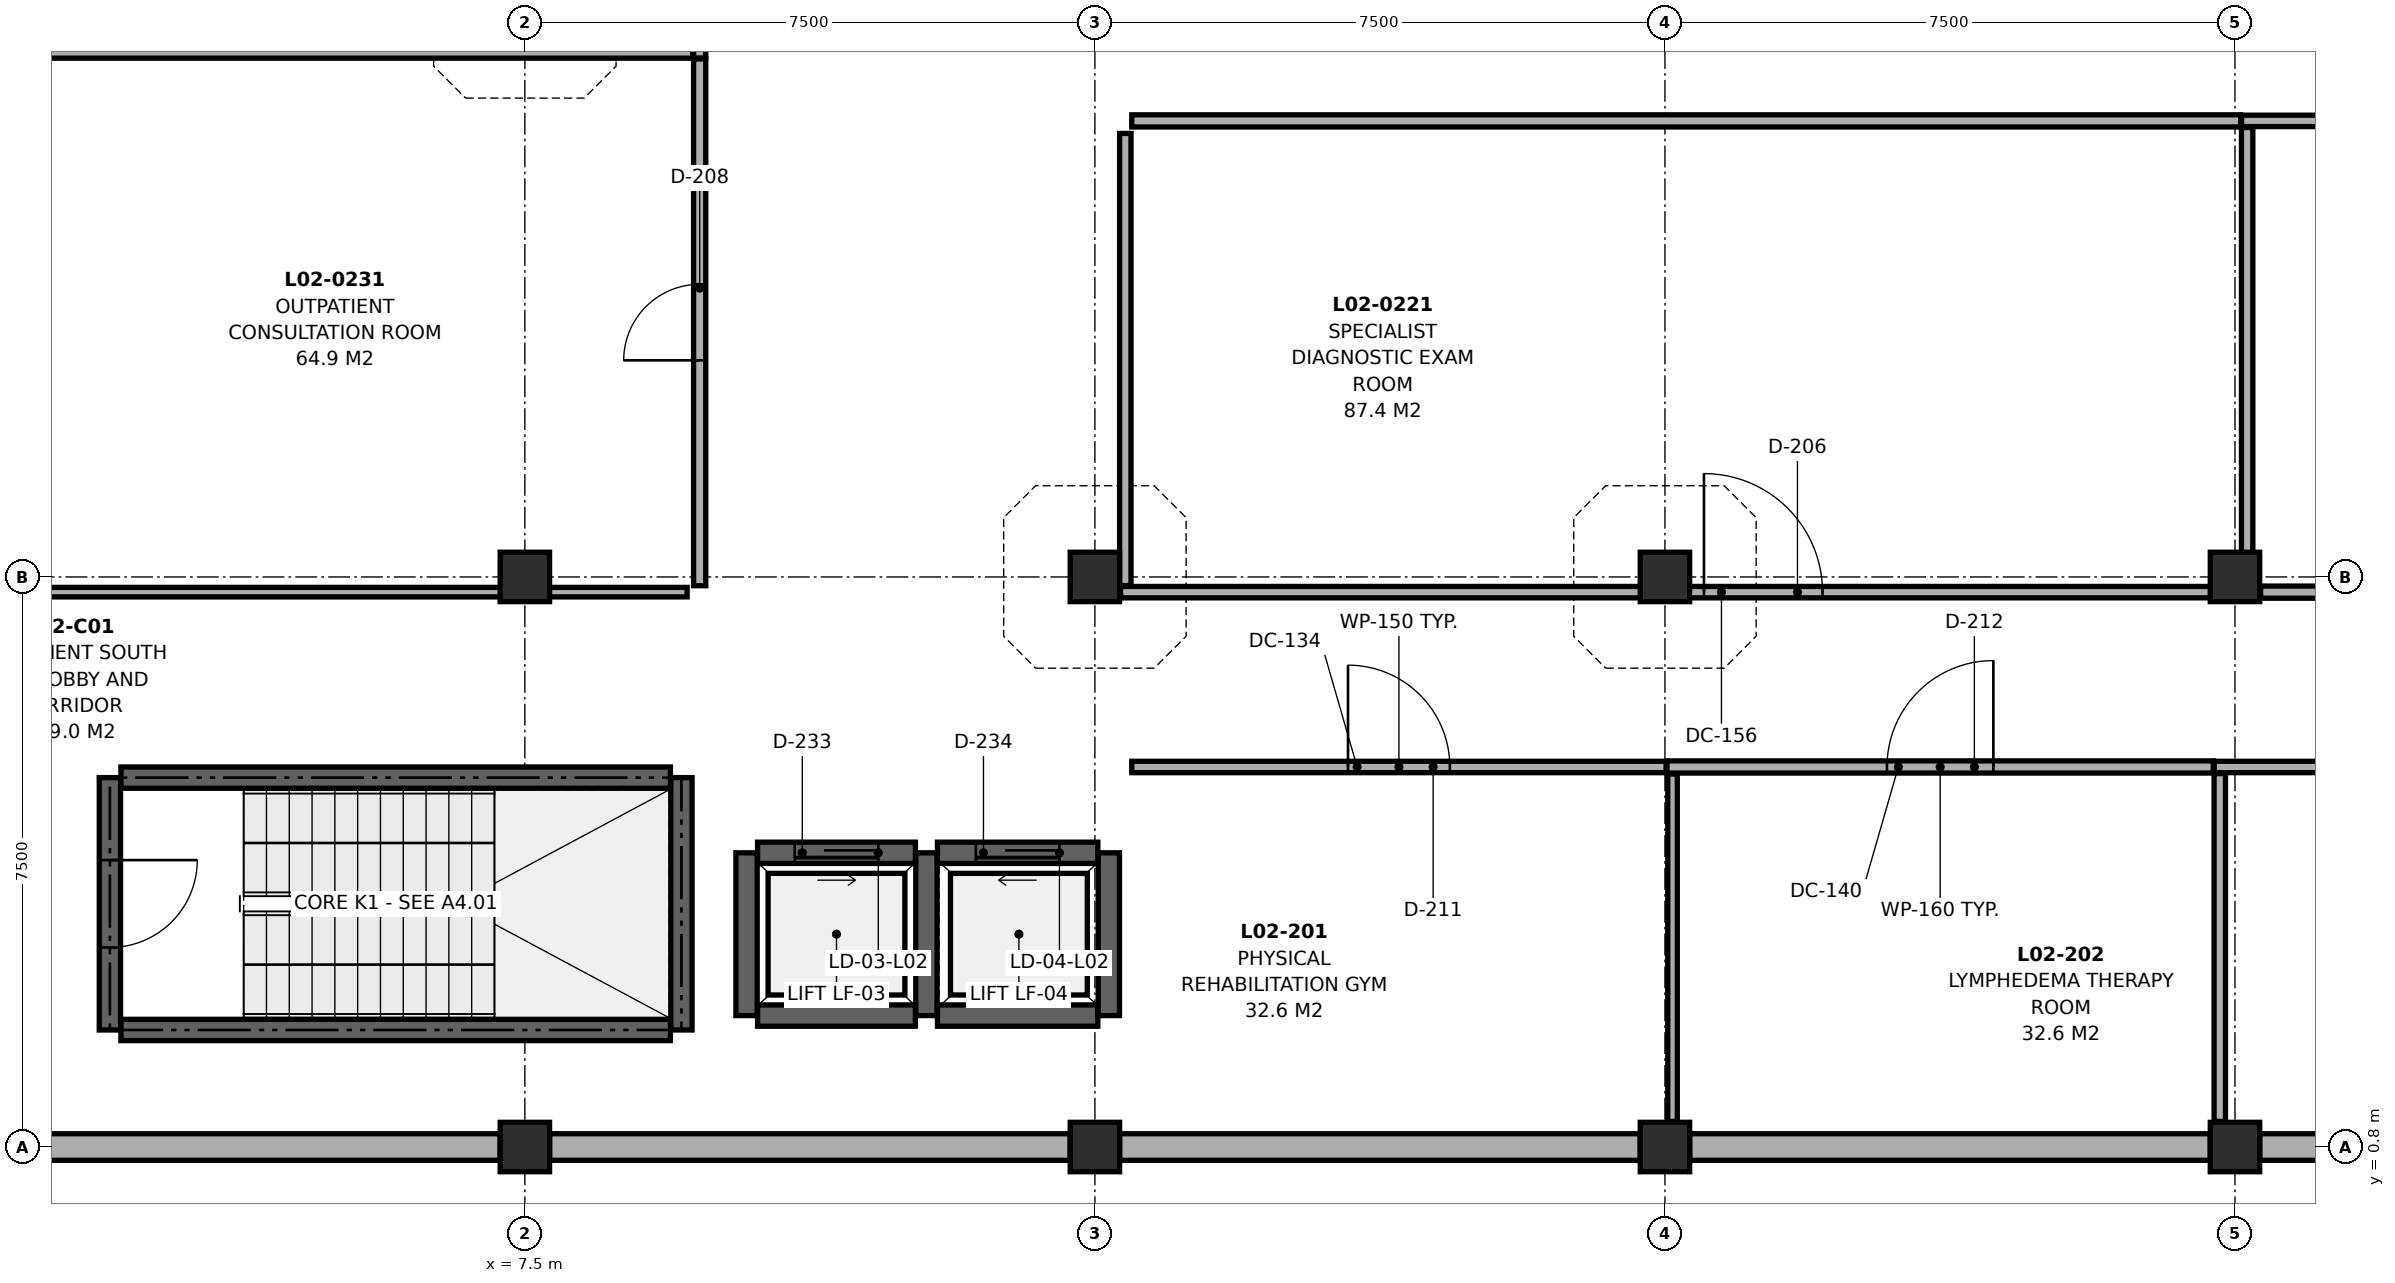
"""IFC4 building model, lengths in metres.
Left out: names, types, materials, properties, quantities, classifications, styles, units other than length and angle.
Written with IfcOpenShell. Run it as: python <this file> out.ifc"""

import sys

from ifc_helpers import new_model, si_unit, direction, frame, frame_2d, origin, origin_2d, place, context, subcontext, project, spatial, rectangle, extrude, element, fill, save


model = new_model("IFC4")
c1 = context("Model", 3, precision=1e-05, world=origin(), true_north=direction((0.0, 1.0)))
c2 = subcontext(c1, "Body", "Model", "MODEL_VIEW")
j1 = project(units=[si_unit("LENGTHUNIT", "METRE"), si_unit("PLANEANGLEUNIT", "RADIAN")], contexts=[c1])
p1 = place(None, origin())
s1 = spatial("IfcSite", under=j1, at=p1, CompositionType="ELEMENT")
p2 = place(p1, origin())
s2 = spatial("IfcBuilding", under=s1, at=p2, CompositionType="ELEMENT")
p3 = place(p2, frame((0.0, 0.0, 9.5)))
s3 = spatial("IfcBuildingStorey", under=s2, at=p3, CompositionType="ELEMENT", Elevation=9.5)
for number, where, z_axis, x_axis in (
    (1, (7.5, 0.8, 0.0), (0.0, 0.0, 1.0), (1.0, 0.0, 0.0)),
    (2, (7.5, 8.3, 0.0), (0.0, 0.0, 1.0), (1.0, 0.0, 0.0)),
    (3, (15.0, 0.8, 0.0), (0.0, 0.0, 1.0), (1.0, 0.0, 0.0)),
    (4, (15.0, 8.3, 0.0), (0.0, 0.0, 1.0), (1.0, 0.0, 0.0)),
    (5, (22.5, 0.8, 0.0), (0.0, 0.0, 1.0), (1.0, 0.0, 0.0)),
    (6, (22.5, 8.3, 0.0), (0.0, 0.0, 1.0), (1.0, 0.0, 0.0)),
    (7, (30.0, 0.8, 0.0), (0.0, 0.0, 1.0), (1.0, 0.0, 0.0)),
    (8, (30.0, 8.3, 0.0), (0.0, 0.0, 1.0), (1.0, 0.0, 0.0)),
):
    element("IfcColumn", number, at=place(p3, frame(where, z_axis=z_axis, x_axis=x_axis)), inside=s3, PredefinedType="COLUMN", context=c2, shape_type="SweptSolid", body=[
        extrude(rectangle(XDim=0.65, YDim=0.65, at=origin_2d()), origin(), (0.0, 0.0, 1.0), 3.7),
    ])
p4 = place(p3, frame((37.2, 0.8, 0.0), z_axis=(0.0, 0.0, 1.0), x_axis=(-1.0, 0.0, 0.0)))
e9 = element("IfcWall", 9, at=p4, inside=s3, PredefinedType="SOLIDWALL", context=c2, shape_type="SweptSolid", body=[
    extrude(rectangle(XDim=6.875, YDim=0.35, at=frame_2d((3.438, 0.0))), origin(), (0.0, 0.0, 1.0), 2.985),
])
for number, where, z_axis, x_axis in (
    (10, (29.675, 0.8, 0.0), (0.0, 0.0, 1.0), (-1.0, 0.0, 0.0)),
    (11, (22.175, 0.8, 0.0), (0.0, 0.0, 1.0), (-1.0, 0.0, 0.0)),
):
    element("IfcWall", number, at=place(p3, frame(where, z_axis=z_axis, x_axis=x_axis)), inside=s3, PredefinedType="SOLIDWALL", context=c2, shape_type="SweptSolid", body=[
        extrude(rectangle(XDim=6.85, YDim=0.35, at=frame_2d((3.425, 0.0))), origin(), (0.0, 0.0, 1.0), 2.785),
    ])
for number, where, z_axis, x_axis in (
    (12, (14.675, 0.8, 0.0), (0.0, 0.0, 1.0), (-1.0, 0.0, 0.0)),
    (13, (7.175, 0.8, 0.0), (0.0, 0.0, 1.0), (-1.0, 0.0, 0.0)),
):
    element("IfcWall", number, at=place(p3, frame(where, z_axis=z_axis, x_axis=x_axis)), inside=s3, PredefinedType="SOLIDWALL", context=c2, shape_type="SweptSolid", body=[
        extrude(rectangle(XDim=6.85, YDim=0.35, at=frame_2d((3.425, 0.0))), origin(), (0.0, 0.0, 1.0), 3.035),
    ])
p5 = place(p3, frame((2.185, 2.34, 0.0), z_axis=(0.0, 0.0, 1.0), x_axis=(1.0, 0.0, 0.0)))
e14 = element("IfcWall", 14, at=p5, inside=s3, PredefinedType="SHEAR", context=c2, shape_type="SweptSolid", body=[
    extrude(rectangle(XDim=7.23, YDim=0.28, at=frame_2d((3.615, 0.0))), origin(), (0.0, 0.0, 1.0), 3.7),
])
p6 = place(p3, frame((9.56, 2.34, 0.0), z_axis=(0.0, 0.0, 1.0), x_axis=(0.0, 1.0, 0.0)))
e15 = element("IfcWall", 15, at=p6, inside=s3, PredefinedType="SHEAR", context=c2, shape_type="SweptSolid", body=[
    extrude(rectangle(XDim=3.32, YDim=0.28, at=frame_2d((1.66, 0.0))), origin(), (0.0, 0.0, 1.0), 3.7),
])
p7 = place(p3, frame((9.415, 5.66, 0.0), z_axis=(0.0, 0.0, 1.0), x_axis=(-1.0, 0.0, 0.0)))
e16 = element("IfcWall", 16, at=p7, inside=s3, PredefinedType="SHEAR", context=c2, shape_type="SweptSolid", body=[
    extrude(rectangle(XDim=7.23, YDim=0.28, at=frame_2d((3.615, 0.0))), origin(), (0.0, 0.0, 1.0), 3.7),
])
p8 = place(p3, frame((2.04, 5.66, 0.0), z_axis=(0.0, 0.0, 1.0), x_axis=(0.0, -1.0, 0.0)))
e17 = element("IfcWall", 17, at=p8, inside=s3, PredefinedType="SHEAR", context=c2, shape_type="SweptSolid", body=[
    extrude(rectangle(XDim=3.32, YDim=0.28, at=frame_2d((1.66, 0.0))), origin(), (0.0, 0.0, 1.0), 3.7),
])
p9 = place(p8, frame((1.085, 0.0, 0.0)))
e18 = element("IfcOpeningElement", 18, at=p9, cuts=e17, PredefinedType="OPENING", context=c2, shape_type="SweptSolid", body=[
    extrude(rectangle(XDim=1.15, YDim=2.15, at=frame_2d((0.575, 1.075))), frame((0.0, 0.152, 0.0), z_axis=(0.0, -1.0, 0.0), x_axis=(1.0, 0.0, 0.0)), (0.0, 0.0, 1.0), 0.304),
])
p10 = place(p3, frame((10.562, 2.529, 0.0), z_axis=(0.0, 0.0, 1.0), x_axis=(1.0, 0.0, 0.0)))
e19 = element("IfcWall", 19, at=p10, inside=s3, PredefinedType="SHEAR", context=c2, shape_type="SweptSolid", body=[
    extrude(rectangle(XDim=2.077, YDim=0.28, at=frame_2d((1.039, 0.0))), origin(), (0.0, 0.0, 1.0), 3.7),
])
p11 = place(p3, frame((12.783, 2.529, 0.0), z_axis=(0.0, 0.0, 1.0), x_axis=(0.0, 1.0, 0.0)))
e20 = element("IfcWall", 20, at=p11, inside=s3, PredefinedType="SHEAR", context=c2, shape_type="SweptSolid", body=[
    extrude(rectangle(XDim=2.141, YDim=0.28, at=frame_2d((1.071, 0.0))), origin(), (0.0, 0.0, 1.0), 3.7),
])
p12 = place(p3, frame((12.638, 4.671, 0.0), z_axis=(0.0, 0.0, 1.0), x_axis=(-1.0, 0.0, 0.0)))
e21 = element("IfcWall", 21, at=p12, inside=s3, PredefinedType="SHEAR", context=c2, shape_type="SweptSolid", body=[
    extrude(rectangle(XDim=2.077, YDim=0.28, at=frame_2d((1.039, 0.0))), origin(), (0.0, 0.0, 1.0), 3.7),
])
p13 = place(p12, frame((0.489, 0.0, 0.0)))
e22 = element("IfcOpeningElement", 22, at=p13, cuts=e21, PredefinedType="OPENING", context=c2, shape_type="SweptSolid", body=[
    extrude(rectangle(XDim=1.1, YDim=2.15, at=frame_2d((0.55, 1.075))), frame((0.0, 0.152, 0.0), z_axis=(0.0, -1.0, 0.0), x_axis=(1.0, 0.0, 0.0)), (0.0, 0.0, 1.0), 0.304),
])
p14 = place(p3, frame((10.417, 4.671, 0.0), z_axis=(0.0, 0.0, 1.0), x_axis=(0.0, -1.0, 0.0)))
e23 = element("IfcWall", 23, at=p14, inside=s3, PredefinedType="SHEAR", context=c2, shape_type="SweptSolid", body=[
    extrude(rectangle(XDim=2.141, YDim=0.28, at=frame_2d((1.071, 0.0))), origin(), (0.0, 0.0, 1.0), 3.7),
])
p15 = place(p3, frame((12.928, 2.529, 0.0), z_axis=(0.0, 0.0, 1.0), x_axis=(1.0, 0.0, 0.0)))
e24 = element("IfcWall", 24, at=p15, inside=s3, PredefinedType="SHEAR", context=c2, shape_type="SweptSolid", body=[
    extrude(rectangle(XDim=2.11, YDim=0.28, at=frame_2d((1.055, 0.0))), origin(), (0.0, 0.0, 1.0), 3.7),
])
p16 = place(p3, frame((15.184, 2.529, 0.0), z_axis=(0.0, 0.0, 1.0), x_axis=(0.0, 1.0, 0.0)))
e25 = element("IfcWall", 25, at=p16, inside=s3, PredefinedType="SHEAR", context=c2, shape_type="SweptSolid", body=[
    extrude(rectangle(XDim=2.141, YDim=0.28, at=frame_2d((1.071, 0.0))), origin(), (0.0, 0.0, 1.0), 3.7),
])
p17 = place(p3, frame((15.039, 4.671, 0.0), z_axis=(0.0, 0.0, 1.0), x_axis=(-1.0, 0.0, 0.0)))
e26 = element("IfcWall", 26, at=p17, inside=s3, PredefinedType="SHEAR", context=c2, shape_type="SweptSolid", body=[
    extrude(rectangle(XDim=2.11, YDim=0.28, at=frame_2d((1.055, 0.0))), origin(), (0.0, 0.0, 1.0), 3.7),
])
p18 = place(p17, frame((0.505, 0.0, 0.0)))
e27 = element("IfcOpeningElement", 27, at=p18, cuts=e26, PredefinedType="OPENING", context=c2, shape_type="SweptSolid", body=[
    extrude(rectangle(XDim=1.1, YDim=2.15, at=frame_2d((0.55, 1.075))), frame((0.0, 0.152, 0.0), z_axis=(0.0, -1.0, 0.0), x_axis=(1.0, 0.0, 0.0)), (0.0, 0.0, 1.0), 0.304),
])
p19 = place(p3, frame((15.485, 5.8, 0.0), z_axis=(0.0, 0.0, 1.0), x_axis=(1.0, 0.0, 0.0)))
e28 = element("IfcWall", 28, at=p19, inside=s3, PredefinedType="PARTITIONING", context=c2, shape_type="SweptSolid", body=[
    extrude(rectangle(XDim=7.03, YDim=0.15, at=frame_2d((3.515, 0.0))), origin(), (0.0, 0.0, 1.0), 2.785),
])
p20 = place(p19, frame((2.845, 0.0, 0.0)))
e29 = element("IfcOpeningElement", 29, at=p20, cuts=e28, PredefinedType="OPENING", context=c2, shape_type="SweptSolid", body=[
    extrude(rectangle(XDim=1.34, YDim=2.24, at=frame_2d((0.67, 1.12))), frame((0.0, 0.087, 0.0), z_axis=(0.0, -1.0, 0.0), x_axis=(1.0, 0.0, 0.0)), (0.0, 0.0, 1.0), 0.174),
])
p21 = place(p3, frame((22.527, 5.8, 0.0), z_axis=(0.0, 0.0, 1.0), x_axis=(1.0, 0.0, 0.0)))
e30 = element("IfcWall", 30, at=p21, inside=s3, PredefinedType="PARTITIONING", context=c2, shape_type="SweptSolid", body=[
    extrude(rectangle(XDim=7.188, YDim=0.16, at=frame_2d((3.594, 0.0))), origin(), (0.0, 0.0, 1.0), 2.785),
])
p22 = place(p21, frame((2.894, 0.0, 0.0)))
e31 = element("IfcOpeningElement", 31, at=p22, cuts=e30, PredefinedType="OPENING", context=c2, shape_type="SweptSolid", body=[
    extrude(rectangle(XDim=1.4, YDim=2.25, at=frame_2d((0.7, 1.125))), frame((0.0, 0.092, 0.0), z_axis=(0.0, -1.0, 0.0), x_axis=(1.0, 0.0, 0.0)), (0.0, 0.0, 1.0), 0.184),
])
p23 = place(p3, frame((29.727, 5.8, 0.0), z_axis=(0.0, 0.0, 1.0), x_axis=(1.0, 0.0, 0.0)))
e32 = element("IfcWall", 32, at=p23, inside=s3, PredefinedType="PARTITIONING", context=c2, shape_type="SweptSolid", body=[
    extrude(rectangle(XDim=9.388, YDim=0.15, at=frame_2d((4.694, 0.0))), origin(), (0.0, 0.0, 1.0), 2.985),
])
p24 = place(p23, frame((3.969, 0.0, 0.0)))
e33 = element("IfcOpeningElement", 33, at=p24, cuts=e32, PredefinedType="OPENING", context=c2, shape_type="SweptSolid", body=[
    extrude(rectangle(XDim=1.45, YDim=2.26, at=frame_2d((0.725, 1.13))), frame((0.0, 0.087, 0.0), z_axis=(0.0, -1.0, 0.0), x_axis=(1.0, 0.0, 0.0)), (0.0, 0.0, 1.0), 0.174),
])
p25 = place(p3, frame((15.337, 8.1, 0.0), z_axis=(0.0, 0.0, 1.0), x_axis=(1.0, 0.0, 0.0)))
e34 = element("IfcWall", 34, at=p25, inside=s3, PredefinedType="PARTITIONING", context=c2, shape_type="SweptSolid", body=[
    extrude(rectangle(XDim=14.571, YDim=0.15, at=frame_2d((7.286, 0.0))), origin(), (0.0, 0.0, 1.0), 2.785),
])
p26 = place(p25, frame((7.677, 0.0, 0.0)))
e35 = element("IfcOpeningElement", 35, at=p26, cuts=e34, PredefinedType="OPENING", context=c2, shape_type="SweptSolid", body=[
    extrude(rectangle(XDim=1.56, YDim=2.3, at=frame_2d((0.78, 1.15))), frame((0.0, 0.087, 0.0), z_axis=(0.0, -1.0, 0.0), x_axis=(1.0, 0.0, 0.0)), (0.0, 0.0, 1.0), 0.174),
])
p27 = place(p3, frame((30.337, 8.1, 0.0), z_axis=(0.0, 0.0, 1.0), x_axis=(1.0, 0.0, 0.0)))
e36 = element("IfcWall", 36, at=p27, inside=s3, PredefinedType="PARTITIONING", context=c2, shape_type="SweptSolid", body=[
    extrude(rectangle(XDim=14.376, YDim=0.16, at=frame_2d((7.188, 0.0))), origin(), (0.0, 0.0, 1.0), 2.985),
])
p28 = place(p27, frame((7.89, 0.0, 0.0)))
e37 = element("IfcOpeningElement", 37, at=p28, cuts=e36, PredefinedType="OPENING", context=c2, shape_type="SweptSolid", body=[
    extrude(rectangle(XDim=1.65, YDim=2.32, at=frame_2d((0.825, 1.16))), frame((0.0, 0.092, 0.0), z_axis=(0.0, -1.0, 0.0), x_axis=(1.0, 0.0, 0.0)), (0.0, 0.0, 1.0), 0.184),
])
p29 = place(p3, frame((9.8, 8.185, 0.0), z_axis=(0.0, 0.0, 1.0), x_axis=(0.0, 1.0, 0.0)))
e38 = element("IfcWall", 38, at=p29, inside=s3, PredefinedType="PARTITIONING", context=c2, shape_type="SweptSolid", body=[
    extrude(rectangle(XDim=6.93, YDim=0.16, at=frame_2d((3.465, 0.0))), origin(), (0.0, 0.0, 1.0), 2.785),
])
p30 = place(p29, frame((2.965, 0.0, 0.0)))
e39 = element("IfcOpeningElement", 39, at=p30, cuts=e38, PredefinedType="OPENING", context=c2, shape_type="SweptSolid", body=[
    extrude(rectangle(XDim=1.0, YDim=2.15, at=frame_2d((0.5, 1.075))), frame((0.0, 0.092, 0.0), z_axis=(0.0, -1.0, 0.0), x_axis=(1.0, 0.0, 0.0)), (0.0, 0.0, 1.0), 0.184),
])
p31 = place(p3, frame((9.8, 15.127, 0.0), z_axis=(0.0, 0.0, 1.0), x_axis=(0.0, 1.0, 0.0)))
e40 = element("IfcWall", 40, at=p31, inside=s3, PredefinedType="PARTITIONING", context=c2, shape_type="SweptSolid", body=[
    extrude(rectangle(XDim=7.188, YDim=0.16, at=frame_2d((3.594, 0.0))), origin(), (0.0, 0.0, 1.0), 2.785),
])
p32 = place(p31, frame((3.069, 0.0, 0.0)))
e41 = element("IfcOpeningElement", 41, at=p32, cuts=e40, PredefinedType="OPENING", context=c2, shape_type="SweptSolid", body=[
    extrude(rectangle(XDim=1.05, YDim=2.15, at=frame_2d((0.525, 1.075))), frame((0.0, 0.092, 0.0), z_axis=(0.0, -1.0, 0.0), x_axis=(1.0, 0.0, 0.0)), (0.0, 0.0, 1.0), 0.184),
])
p33 = place(p3, frame((15.485, 14.3, 0.0), z_axis=(0.0, 0.0, 1.0), x_axis=(1.0, 0.0, 0.0)))
e42 = element("IfcWall", 42, at=p33, inside=s3, PredefinedType="PARTITIONING", context=c2, shape_type="SweptSolid", body=[
    extrude(rectangle(XDim=14.59, YDim=0.16, at=frame_2d((7.295, 0.0))), origin(), (0.0, 0.0, 1.0), 2.785),
])
p34 = place(p3, frame((30.087, 14.3, 0.0), z_axis=(0.0, 0.0, 1.0), x_axis=(1.0, 0.0, 0.0)))
e43 = element("IfcWall", 43, at=p34, inside=s3, PredefinedType="PARTITIONING", context=c2, shape_type="SweptSolid", body=[
    extrude(rectangle(XDim=14.726, YDim=0.15, at=frame_2d((7.363, 0.0))), origin(), (0.0, 0.0, 1.0), 2.985),
])
p35 = place(p3, frame((22.6, 1.137, 0.0), z_axis=(0.0, 0.0, 1.0), x_axis=(0.0, 1.0, 0.0)))
e44 = element("IfcWall", 44, at=p35, inside=s3, PredefinedType="PARTITIONING", context=c2, shape_type="SweptSolid", body=[
    extrude(rectangle(XDim=4.571, YDim=0.125, at=frame_2d((2.286, 0.0))), origin(), (0.0, 0.0, 1.0), 2.785),
])
p36 = place(p3, frame((29.8, 1.137, 0.0), z_axis=(0.0, 0.0, 1.0), x_axis=(0.0, 1.0, 0.0)))
e45 = element("IfcWall", 45, at=p36, inside=s3, PredefinedType="PARTITIONING", context=c2, shape_type="SweptSolid", body=[
    extrude(rectangle(XDim=4.576, YDim=0.15, at=frame_2d((2.288, 0.0))), origin(), (0.0, 0.0, 1.0), 2.985),
])
p37 = place(p3, frame((15.4, 8.187, 0.0), z_axis=(0.0, 0.0, 1.0), x_axis=(0.0, 1.0, 0.0)))
e46 = element("IfcWall", 46, at=p37, inside=s3, PredefinedType="PARTITIONING", context=c2, shape_type="SweptSolid", body=[
    extrude(rectangle(XDim=5.948, YDim=0.15, at=frame_2d((2.974, 0.0))), origin(), (0.0, 0.0, 1.0), 2.785),
])
p38 = place(p3, frame((30.16, 8.432, 0.0), z_axis=(0.0, 0.0, 1.0), x_axis=(0.0, 1.0, 0.0)))
e47 = element("IfcWall", 47, at=p38, inside=s3, PredefinedType="PARTITIONING", context=c2, shape_type="SweptSolid", body=[
    extrude(rectangle(XDim=5.781, YDim=0.15, at=frame_2d((2.891, 0.0))), origin(), (0.0, 0.0, 1.0), 2.985),
])
p39 = place(p3, frame((0.337, 8.1, 0.0), z_axis=(0.0, 0.0, 1.0), x_axis=(1.0, 0.0, 0.0)))
e48 = element("IfcWall", 48, at=p39, inside=s3, PredefinedType="PARTITIONING", context=c2, shape_type="SweptSolid", body=[
    extrude(rectangle(XDim=9.298, YDim=0.125, at=frame_2d((4.649, 0.0))), origin(), (0.0, 0.0, 1.0), 2.785),
])
p40 = place(p3, frame((0.187, 15.2, 0.0), z_axis=(0.0, 0.0, 1.0), x_axis=(1.0, 0.0, 0.0)))
e49 = element("IfcWall", 49, at=p40, inside=s3, PredefinedType="PARTITIONING", context=c2, shape_type="SweptSolid", body=[
    extrude(rectangle(XDim=9.521, YDim=0.15, at=frame_2d((4.76, 0.0))), origin(), (0.0, 0.0, 1.0), 2.785),
])
p41 = place(p9, origin())
e50 = element("IfcDoor", 50, at=p41, inside=s3, OperationType="SINGLE_SWING_LEFT", PredefinedType="DOOR", context=c2, shape_type="SweptSolid", body=[
    extrude(rectangle(XDim=1.15, YDim=2.15, at=frame_2d((0.575, 1.075))), frame((0.0, 0.025, 0.0), z_axis=(0.0, -1.0, 0.0), x_axis=(1.0, 0.0, 0.0)), (0.0, 0.0, 1.0), 0.05),
])
fill(e18, e50)
p42 = place(p13, origin())
e51 = element("IfcDoor", 51, at=p42, inside=s3, OperationType="SLIDING_TO_LEFT", PredefinedType="DOOR", context=c2, shape_type="SweptSolid", body=[
    extrude(rectangle(XDim=1.1, YDim=2.15, at=frame_2d((0.55, 1.075))), frame((0.0, 0.025, 0.0), z_axis=(0.0, -1.0, 0.0), x_axis=(1.0, 0.0, 0.0)), (0.0, 0.0, 1.0), 0.05),
])
fill(e22, e51)
p43 = place(p18, origin())
e52 = element("IfcDoor", 52, at=p43, inside=s3, OperationType="SLIDING_TO_RIGHT", PredefinedType="DOOR", context=c2, shape_type="SweptSolid", body=[
    extrude(rectangle(XDim=1.1, YDim=2.15, at=frame_2d((0.55, 1.075))), frame((0.0, 0.025, 0.0), z_axis=(0.0, -1.0, 0.0), x_axis=(1.0, 0.0, 0.0)), (0.0, 0.0, 1.0), 0.05),
])
fill(e27, e52)
p44 = place(p20, origin())
e53 = element("IfcDoor", 53, at=p44, inside=s3, OperationType="SINGLE_SWING_LEFT", PredefinedType="DOOR", context=c2, shape_type="SweptSolid", body=[
    extrude(rectangle(XDim=1.34, YDim=2.24, at=frame_2d((0.67, 1.12))), frame((0.0, 0.025, 0.0), z_axis=(0.0, -1.0, 0.0), x_axis=(1.0, 0.0, 0.0)), (0.0, 0.0, 1.0), 0.05),
])
fill(e29, e53)
p45 = place(p22, origin())
e54 = element("IfcDoor", 54, at=p45, inside=s3, OperationType="SINGLE_SWING_RIGHT", PredefinedType="DOOR", context=c2, shape_type="SweptSolid", body=[
    extrude(rectangle(XDim=1.4, YDim=2.25, at=frame_2d((0.7, 1.125))), frame((0.0, 0.025, 0.0), z_axis=(0.0, -1.0, 0.0), x_axis=(1.0, 0.0, 0.0)), (0.0, 0.0, 1.0), 0.05),
])
fill(e31, e54)
p46 = place(p26, origin())
e55 = element("IfcDoor", 55, at=p46, inside=s3, OperationType="SINGLE_SWING_LEFT", PredefinedType="DOOR", context=c2, shape_type="SweptSolid", body=[
    extrude(rectangle(XDim=1.56, YDim=2.3, at=frame_2d((0.78, 1.15))), frame((0.0, 0.025, 0.0), z_axis=(0.0, -1.0, 0.0), x_axis=(1.0, 0.0, 0.0)), (0.0, 0.0, 1.0), 0.05),
])
fill(e35, e55)
p47 = place(p30, origin())
e56 = element("IfcDoor", 56, at=p47, inside=s3, OperationType="SINGLE_SWING_LEFT", PredefinedType="DOOR", context=c2, shape_type="SweptSolid", body=[
    extrude(rectangle(XDim=1.0, YDim=2.15, at=frame_2d((0.5, 1.075))), frame((0.0, 0.025, 0.0), z_axis=(0.0, -1.0, 0.0), x_axis=(1.0, 0.0, 0.0)), (0.0, 0.0, 1.0), 0.05),
])
fill(e39, e56)
save(model, sys.argv[1])
